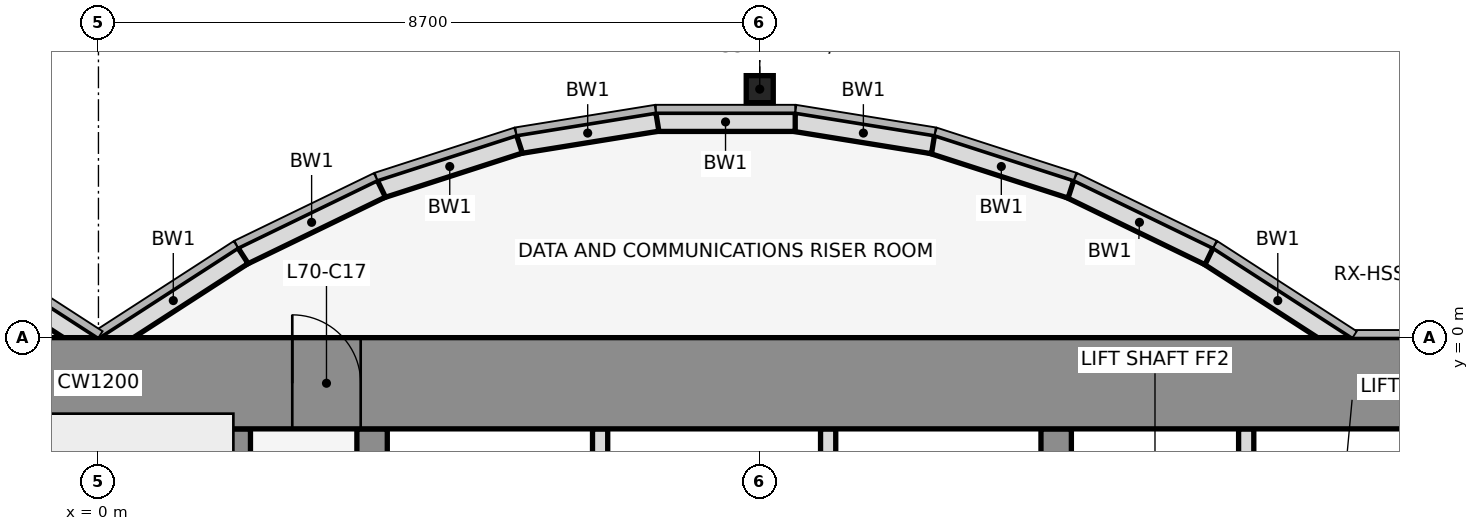
"""IFC4 building model, lengths in metres.
Left out: names, types, materials, properties, quantities, classifications, styles, units other than length and angle.
Written with IfcOpenShell. Run it as: python <this file> out.ifc"""

import sys

from ifc_helpers import new_model, si_unit, direction, frame, frame_2d, origin, origin_2d, place, context, subcontext, project, spatial, rectangle, hollow_rectangle, extrude, element, fill, save


model = new_model("IFC4")
c1 = context("Model", 3, precision=1e-05, world=origin(), true_north=direction((0.0, 1.0)))
c2 = subcontext(c1, "Body", "Model", "MODEL_VIEW")
j1 = project(units=[si_unit("LENGTHUNIT", "METRE"), si_unit("PLANEANGLEUNIT", "RADIAN")], contexts=[c1])
p1 = place(None, origin())
s1 = spatial("IfcSite", under=j1, at=p1, CompositionType="ELEMENT")
p2 = place(p1, origin())
s2 = spatial("IfcBuilding", under=s1, at=p2, CompositionType="ELEMENT")
p3 = place(p2, frame((0.0, 0.0, 311.0)))
s3 = spatial("IfcBuildingStorey", under=s2, at=p3, CompositionType="ELEMENT", Elevation=311.0)
p4 = place(p3, frame((8.7, 3.269, 0.0), z_axis=(0.0, 0.0, 1.0), x_axis=(1.0, 0.0, 0.0)))
e1 = element("IfcColumn", 1, at=p4, inside=s3, PredefinedType="COLUMN", context=c2, shape_type="SweptSolid", body=[
    extrude(hollow_rectangle(XDim=0.356, YDim=0.356, WallThickness=0.012, at=origin_2d()), origin(), (0.0, 0.0, 1.0), 4.5),
])
p5 = place(p3, frame((16.432, -0.105, 0.0), z_axis=(0.0, 0.0, 1.0), x_axis=(-0.83981312244, 0.542875602121, 0.0)))
e2 = element("IfcWall", 2, at=p5, inside=s3, PredefinedType="STANDARD", context=c2, shape_type="SweptSolid", body=[
    extrude(rectangle(XDim=2.183, YDim=0.25, at=frame_2d((1.091, 0.0))), origin(), (0.0, 0.0, 1.0), 4.35),
])
p6 = place(p3, frame((14.612, 1.073, 0.0), z_axis=(0.0, 0.0, 1.0), x_axis=(-0.89982408427, 0.436252928206, 0.0)))
e3 = element("IfcWall", 3, at=p6, inside=s3, PredefinedType="STANDARD", context=c2, shape_type="SweptSolid", body=[
    extrude(rectangle(XDim=2.038, YDim=0.25, at=frame_2d((1.019, 0.0))), origin(), (0.0, 0.0, 1.0), 4.35),
])
p7 = place(p3, frame((12.795, 1.955, 0.0), z_axis=(0.0, 0.0, 1.0), x_axis=(-0.951495806175, 0.307661714928, 0.0)))
e4 = element("IfcWall", 4, at=p7, inside=s3, PredefinedType="STANDARD", context=c2, shape_type="SweptSolid", body=[
    extrude(rectangle(XDim=1.927, YDim=0.25, at=frame_2d((0.963, 0.0))), origin(), (0.0, 0.0, 1.0), 4.35),
])
p8 = place(p3, frame((10.98, 2.543, 0.0), z_axis=(0.0, 0.0, 1.0), x_axis=(-0.987181718931, 0.159600293885, 0.0)))
e5 = element("IfcWall", 5, at=p8, inside=s3, PredefinedType="STANDARD", context=c2, shape_type="SweptSolid", body=[
    extrude(rectangle(XDim=1.857, YDim=0.25, at=frame_2d((0.929, 0.0))), origin(), (0.0, 0.0, 1.0), 4.35),
])
p9 = place(p3, frame((9.167, 2.838, 0.0), z_axis=(0.0, 0.0, 1.0), x_axis=(-1.0, 0.0, 0.0)))
e6 = element("IfcWall", 6, at=p9, inside=s3, PredefinedType="STANDARD", context=c2, shape_type="SweptSolid", body=[
    extrude(rectangle(XDim=1.833, YDim=0.25, at=frame_2d((0.917, 0.0))), origin(), (0.0, 0.0, 1.0), 4.35),
])
p10 = place(p3, frame((7.353, 2.84, 0.0), z_axis=(0.0, 0.0, 1.0), x_axis=(-0.987181718931, -0.159600293885, 0.0)))
e7 = element("IfcWall", 7, at=p10, inside=s3, PredefinedType="STANDARD", context=c2, shape_type="SweptSolid", body=[
    extrude(rectangle(XDim=1.857, YDim=0.25, at=frame_2d((0.929, 0.0))), origin(), (0.0, 0.0, 1.0), 4.35),
])
p11 = place(p3, frame((5.538, 2.548, 0.0), z_axis=(0.0, 0.0, 1.0), x_axis=(-0.951495806175, -0.307661714928, 0.0)))
e8 = element("IfcWall", 8, at=p11, inside=s3, PredefinedType="STANDARD", context=c2, shape_type="SweptSolid", body=[
    extrude(rectangle(XDim=1.927, YDim=0.25, at=frame_2d((0.963, 0.0))), origin(), (0.0, 0.0, 1.0), 4.35),
])
p12 = place(p3, frame((3.721, 1.962, 0.0), z_axis=(0.0, 0.0, 1.0), x_axis=(-0.89982408427, -0.436252928206, 0.0)))
e9 = element("IfcWall", 9, at=p12, inside=s3, PredefinedType="STANDARD", context=c2, shape_type="SweptSolid", body=[
    extrude(rectangle(XDim=2.038, YDim=0.25, at=frame_2d((1.019, 0.0))), origin(), (0.0, 0.0, 1.0), 4.35),
])
for number, where, z_axis, x_axis in (
    (10, (1.901, 1.08, 0.0), (0.0, 0.0, 1.0), (-0.84, -0.543, 0.0)),
    (11, (-0.068, -0.105, 0.0), (0.0, 0.0, 1.0), (-0.84, 0.543, 0.0)),
):
    element("IfcWall", number, at=place(p3, frame(where, z_axis=z_axis, x_axis=x_axis)), inside=s3, PredefinedType="STANDARD", context=c2, shape_type="SweptSolid", body=[
        extrude(rectangle(XDim=2.183, YDim=0.25, at=frame_2d((1.091, 0.0))), origin(), (0.0, 0.0, 1.0), 4.35),
    ])
p13 = place(p3, frame((1.8, -11.8, 0.0), z_axis=(0.0, 0.0, 1.0), x_axis=(0.0, 1.0, 0.0)))
e12 = element("IfcWall", 12, at=p13, inside=s3, PredefinedType="SHEAR", context=c2, shape_type="SweptSolid", body=[
    extrude(rectangle(XDim=10.6, YDim=0.4, at=frame_2d((5.3, 0.0))), origin(), (0.0, 0.0, 1.0), 4.5),
])
p14 = place(p3, frame((3.6, -11.8, 0.0), z_axis=(0.0, 0.0, 1.0), x_axis=(0.0, 1.0, 0.0)))
e13 = element("IfcWall", 13, at=p14, inside=s3, PredefinedType="SHEAR", context=c2, shape_type="SweptSolid", body=[
    extrude(rectangle(XDim=10.6, YDim=0.4, at=frame_2d((5.3, 0.0))), origin(), (0.0, 0.0, 1.0), 4.5),
])
p15 = place(p14, frame((1.35, 0.0, 0.0)))
e14 = element("IfcOpeningElement", 14, at=p15, cuts=e13, PredefinedType="OPENING", context=c2, shape_type="SweptSolid", body=[
    extrude(rectangle(XDim=0.9, YDim=2.1, at=frame_2d((0.45, 1.05))), frame((0.0, 0.212, 0.0), z_axis=(0.0, -1.0, 0.0), x_axis=(1.0, 0.0, 0.0)), (0.0, 0.0, 1.0), 0.424),
])
for number, where, z_axis, x_axis in (
    (15, (6.6, -4.6, 0.0), (0.0, 0.0, 1.0), (0.0, 1.0, 0.0)),
    (16, (9.6, -4.6, 0.0), (0.0, 0.0, 1.0), (0.0, 1.0, 0.0)),
):
    element("IfcWall", number, at=place(p3, frame(where, z_axis=z_axis, x_axis=x_axis)), inside=s3, PredefinedType="PARTITIONING", context=c2, shape_type="SweptSolid", body=[
        extrude(rectangle(XDim=3.4, YDim=0.2, at=frame_2d((1.7, 0.0))), origin(), (0.0, 0.0, 1.0), 3.418),
    ])
p16 = place(p3, frame((12.6, -11.8, 0.0), z_axis=(0.0, 0.0, 1.0), x_axis=(0.0, 1.0, 0.0)))
e17 = element("IfcWall", 17, at=p16, inside=s3, PredefinedType="SHEAR", context=c2, shape_type="SweptSolid", body=[
    extrude(rectangle(XDim=10.6, YDim=0.4, at=frame_2d((5.3, 0.0))), origin(), (0.0, 0.0, 1.0), 4.5),
])
p17 = place(p16, frame((4.75, 0.0, 0.0)))
e18 = element("IfcOpeningElement", 18, at=p17, cuts=e17, PredefinedType="OPENING", context=c2, shape_type="SweptSolid", body=[
    extrude(rectangle(XDim=1.1, YDim=2.1, at=frame_2d((0.55, 1.05))), frame((0.0, 0.212, 0.0), z_axis=(0.0, -1.0, 0.0), x_axis=(1.0, 0.0, 0.0)), (0.0, 0.0, 1.0), 0.424),
])
p18 = place(p3, frame((15.1, -4.6, 0.0), z_axis=(0.0, 0.0, 1.0), x_axis=(0.0, 1.0, 0.0)))
e19 = element("IfcWall", 19, at=p18, inside=s3, PredefinedType="PARTITIONING", context=c2, shape_type="SweptSolid", body=[
    extrude(rectangle(XDim=3.4, YDim=0.2, at=frame_2d((1.7, 0.0))), origin(), (0.0, 0.0, 1.0), 3.418),
])
p19 = place(p3, frame((-22.0, -0.6, 0.0), z_axis=(0.0, 0.0, 1.0), x_axis=(1.0, 0.0, 0.0)))
e20 = element("IfcWall", 20, at=p19, inside=s3, PredefinedType="SHEAR", context=c2, shape_type="SweptSolid", body=[
    extrude(rectangle(XDim=44.0, YDim=1.2, at=frame_2d((22.0, 0.0))), origin(), (0.0, 0.0, 1.0), 4.5),
])
p20 = place(p19, frame((18.55, 0.0, 0.0)))
e21 = element("IfcOpeningElement", 21, at=p20, cuts=e20, PredefinedType="OPENING", context=c2, shape_type="SweptSolid", body=[
    extrude(rectangle(XDim=0.9, YDim=2.1, at=frame_2d((0.45, 1.05))), frame((0.0, 0.612, 0.0), z_axis=(0.0, -1.0, 0.0), x_axis=(1.0, 0.0, 0.0)), (0.0, 0.0, 1.0), 1.224),
])
p21 = place(p19, frame((24.55, 0.0, 0.0)))
e22 = element("IfcOpeningElement", 22, at=p21, cuts=e20, PredefinedType="OPENING", context=c2, shape_type="SweptSolid", body=[
    extrude(rectangle(XDim=0.9, YDim=2.1, at=frame_2d((0.45, 1.05))), frame((0.0, 0.612, 0.0), z_axis=(0.0, -1.0, 0.0), x_axis=(1.0, 0.0, 0.0)), (0.0, 0.0, 1.0), 1.224),
])
p22 = place(p21, origin())
e23 = element("IfcDoor", 23, at=p22, inside=s3, OperationType="SINGLE_SWING_LEFT", PredefinedType="DOOR", context=c2, shape_type="SweptSolid", body=[
    extrude(rectangle(XDim=0.9, YDim=2.1, at=frame_2d((0.45, 1.05))), frame((0.0, 0.025, 0.0), z_axis=(0.0, -1.0, 0.0), x_axis=(1.0, 0.0, 0.0)), (0.0, 0.0, 1.0), 0.05),
])
fill(e22, e23)
save(model, sys.argv[1])
